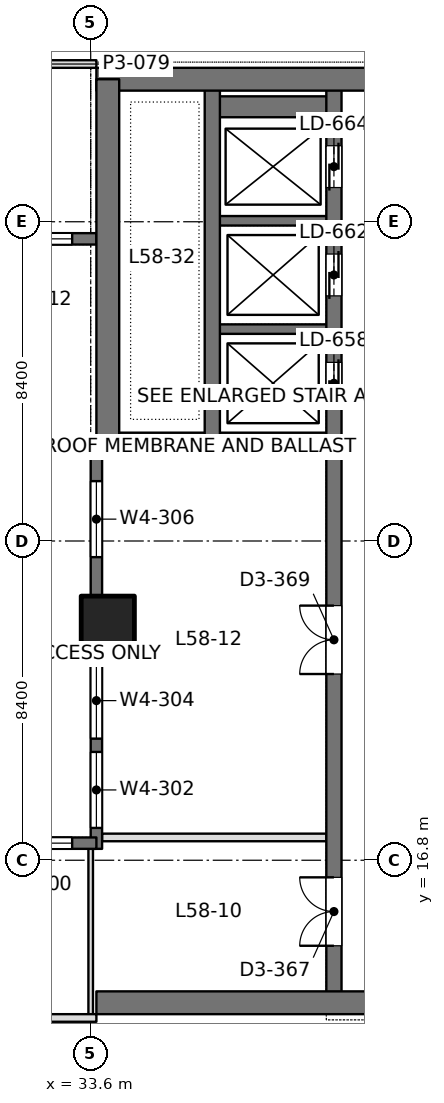
"""IFC4 building model, lengths in metres.
Left out: names, types, materials, properties, quantities, classifications, styles, units other than length and angle.
Written with IfcOpenShell. Run it as: python <this file> out.ifc"""

import sys

from ifc_helpers import new_model, si_unit, direction, frame, frame_2d, origin, origin_2d, place, context, subcontext, project, spatial, rectangle, extrude, element, fill, save


model = new_model("IFC4")
c1 = context("Model", 3, precision=1e-05, world=origin(), true_north=direction((0.0, 1.0)))
c2 = subcontext(c1, "Body", "Model", "MODEL_VIEW")
j1 = project(units=[si_unit("LENGTHUNIT", "METRE"), si_unit("PLANEANGLEUNIT", "RADIAN")], contexts=[c1])
p1 = place(None, origin())
s1 = spatial("IfcSite", under=j1, at=p1, CompositionType="ELEMENT")
p2 = place(p1, origin())
s2 = spatial("IfcBuilding", under=s1, at=p2, CompositionType="ELEMENT")
p3 = place(p2, frame((0.0, 0.0, 254.7)))
s3 = spatial("IfcBuildingStorey", under=s2, at=p3, CompositionType="ELEMENT", Elevation=254.7)
p4 = place(p3, frame((34.05, 23.05, 0.0), z_axis=(0.0, 0.0, 1.0), x_axis=(1.0, 0.0, 0.0)))
e1 = element("IfcColumn", 1, at=p4, inside=s3, PredefinedType="COLUMN", context=c2, shape_type="SweptSolid", body=[
    extrude(rectangle(XDim=1.4, YDim=1.4, at=origin_2d()), origin(), (0.0, 0.0, 1.0), 4.5),
])
p5 = place(p3, frame((33.75, 13.05, 0.0), z_axis=(0.0, 0.0, 1.0), x_axis=(1.0, 0.0, 0.0)))
e2 = element("IfcWall", 2, at=p5, inside=s3, PredefinedType="SHEAR", context=c2, shape_type="SweptSolid", body=[
    extrude(rectangle(XDim=17.7, YDim=0.6, at=frame_2d((8.85, 0.0))), origin(), (0.0, 0.0, 1.0), 4.5),
])
p6 = place(p5, frame((7.1, 0.0, 0.0)))
e3 = element("IfcOpeningElement", 3, at=p6, cuts=e2, PredefinedType="OPENING", context=c2, shape_type="SweptSolid", body=[
    extrude(rectangle(XDim=1.8, YDim=2.4, at=frame_2d((0.9, 1.2))), frame((0.0, 0.31, 0.0), z_axis=(0.0, -1.0, 0.0), x_axis=(1.0, 0.0, 0.0)), (0.0, 0.0, 1.0), 0.62),
])
p7 = place(p3, frame((33.75, 37.35, 0.0), z_axis=(0.0, 0.0, 1.0), x_axis=(1.0, 0.0, 0.0)))
e4 = element("IfcWall", 4, at=p7, inside=s3, PredefinedType="SHEAR", context=c2, shape_type="SweptSolid", body=[
    extrude(rectangle(XDim=17.7, YDim=0.6, at=frame_2d((8.85, 0.0))), origin(), (0.0, 0.0, 1.0), 4.5),
])
p8 = place(p7, frame((7.1, 0.0, 0.0)))
e5 = element("IfcOpeningElement", 5, at=p8, cuts=e4, PredefinedType="OPENING", context=c2, shape_type="SweptSolid", body=[
    extrude(rectangle(XDim=1.8, YDim=2.4, at=frame_2d((0.9, 1.2))), frame((0.0, 0.31, 0.0), z_axis=(0.0, -1.0, 0.0), x_axis=(1.0, 0.0, 0.0)), (0.0, 0.0, 1.0), 0.62),
])
p9 = place(p3, frame((34.05, 27.8, 0.0), z_axis=(0.0, 0.0, 1.0), x_axis=(0.0, 1.0, 0.0)))
e6 = element("IfcWall", 6, at=p9, inside=s3, PredefinedType="SHEAR", context=c2, shape_type="SweptSolid", body=[
    extrude(rectangle(XDim=9.55, YDim=0.6, at=frame_2d((4.775, 0.0))), origin(), (0.0, 0.0, 1.0), 4.5),
])
p10 = place(p3, frame((40.0, 13.05, 0.0), z_axis=(0.0, 0.0, 1.0), x_axis=(0.0, 1.0, 0.0)))
e7 = element("IfcWall", 7, at=p10, inside=s3, PredefinedType="SHEAR", context=c2, shape_type="SweptSolid", body=[
    extrude(rectangle(XDim=24.3, YDim=0.4, at=frame_2d((12.15, 0.0))), origin(), (0.0, 0.0, 1.0), 4.5),
])
p11 = place(p10, frame((15.75, 0.0, 0.0)))
e8 = element("IfcOpeningElement", 8, at=p11, cuts=e7, PredefinedType="OPENING", context=c2, shape_type="SweptSolid", body=[
    extrude(rectangle(XDim=1.1, YDim=2.2, at=frame_2d((0.55, 1.1))), frame((0.0, 0.21, 0.0), z_axis=(0.0, -1.0, 0.0), x_axis=(1.0, 0.0, 0.0)), (0.0, 0.0, 1.0), 0.42),
])
p12 = place(p10, frame((18.6, 0.0, 0.0)))
e9 = element("IfcOpeningElement", 9, at=p12, cuts=e7, PredefinedType="OPENING", context=c2, shape_type="SweptSolid", body=[
    extrude(rectangle(XDim=1.1, YDim=2.2, at=frame_2d((0.55, 1.1))), frame((0.0, 0.21, 0.0), z_axis=(0.0, -1.0, 0.0), x_axis=(1.0, 0.0, 0.0)), (0.0, 0.0, 1.0), 0.42),
])
p13 = place(p10, frame((21.45, 0.0, 0.0)))
e10 = element("IfcOpeningElement", 10, at=p13, cuts=e7, PredefinedType="OPENING", context=c2, shape_type="SweptSolid", body=[
    extrude(rectangle(XDim=1.1, YDim=2.2, at=frame_2d((0.55, 1.1))), frame((0.0, 0.21, 0.0), z_axis=(0.0, -1.0, 0.0), x_axis=(1.0, 0.0, 0.0)), (0.0, 0.0, 1.0), 0.42),
])
p14 = place(p10, frame((8.65, 0.0, 0.0)))
e11 = element("IfcOpeningElement", 11, at=p14, cuts=e7, PredefinedType="OPENING", context=c2, shape_type="SweptSolid", body=[
    extrude(rectangle(XDim=1.8, YDim=2.4, at=frame_2d((0.9, 1.2))), frame((0.0, 0.21, 0.0), z_axis=(0.0, -1.0, 0.0), x_axis=(1.0, 0.0, 0.0)), (0.0, 0.0, 1.0), 0.42),
])
p15 = place(p10, frame((1.5, 0.0, 0.0)))
e12 = element("IfcOpeningElement", 12, at=p15, cuts=e7, PredefinedType="OPENING", context=c2, shape_type="SweptSolid", body=[
    extrude(rectangle(XDim=1.8, YDim=2.4, at=frame_2d((0.9, 1.2))), frame((0.0, 0.21, 0.0), z_axis=(0.0, -1.0, 0.0), x_axis=(1.0, 0.0, 0.0)), (0.0, 0.0, 1.0), 0.42),
])
p16 = place(p3, frame((36.8, 27.925, 0.0), z_axis=(0.0, 0.0, 1.0), x_axis=(0.0, 1.0, 0.0)))
e13 = element("IfcWall", 13, at=p16, inside=s3, PredefinedType="SHEAR", context=c2, shape_type="SweptSolid", body=[
    extrude(rectangle(XDim=9.425, YDim=0.4, at=frame_2d((4.712, 0.0))), origin(), (0.0, 0.0, 1.0), 4.5),
])
p17 = place(p3, frame((40.0, 27.925, 0.0), z_axis=(0.0, 0.0, 1.0), x_axis=(-1.0, 0.0, 0.0)))
e14 = element("IfcWall", 14, at=p17, inside=s3, PredefinedType="SHEAR", context=c2, shape_type="SweptSolid", body=[
    extrude(rectangle(XDim=5.95, YDim=0.25, at=frame_2d((2.975, 0.0))), origin(), (0.0, 0.0, 1.0), 4.5),
])
for number, where, z_axis, x_axis in (
    (15, (40.0, 30.775, 0.0), (0.0, 0.0, 1.0), (-1.0, 0.0, 0.0)),
    (16, (40.0, 33.625, 0.0), (0.0, 0.0, 1.0), (-1.0, 0.0, 0.0)),
):
    element("IfcWall", number, at=place(p3, frame(where, z_axis=z_axis, x_axis=x_axis)), inside=s3, PredefinedType="SHEAR", context=c2, shape_type="SweptSolid", body=[
        extrude(rectangle(XDim=3.2, YDim=0.25, at=frame_2d((1.6, 0.0))), origin(), (0.0, 0.0, 1.0), 4.5),
    ])
p18 = place(p3, frame((40.0, 36.625, 0.0), z_axis=(0.0, 0.0, 1.0), x_axis=(-1.0, 0.0, 0.0)))
e17 = element("IfcWall", 17, at=p18, inside=s3, PredefinedType="SHEAR", context=c2, shape_type="SweptSolid", body=[
    extrude(rectangle(XDim=3.2, YDim=0.55, at=frame_2d((1.6, 0.0))), origin(), (0.0, 0.0, 1.0), 4.5),
])
p19 = place(p3, frame((33.75, 17.1, 0.0), z_axis=(0.0, 0.0, 1.0), x_axis=(0.0, 1.0, 0.0)))
e18 = element("IfcWall", 18, at=p19, inside=s3, PredefinedType="SOLIDWALL", context=c2, shape_type="SweptSolid", body=[
    extrude(rectangle(XDim=10.7, YDim=0.3, at=frame_2d((5.35, 0.0))), origin(), (0.0, 0.0, 1.0), 4.35),
])
p20 = place(p19, frame((0.55, 0.0, 0.9)))
e19 = element("IfcOpeningElement", 19, at=p20, cuts=e18, PredefinedType="OPENING", context=c2, shape_type="SweptSolid", body=[
    extrude(rectangle(XDim=2.0, YDim=1.9, at=frame_2d((1.0, 0.95))), frame((0.0, 0.16, 0.0), z_axis=(0.0, -1.0, 0.0), x_axis=(1.0, 0.0, 0.0)), (0.0, 0.0, 1.0), 0.32),
])
p21 = place(p19, frame((2.9, 0.0, 0.9)))
e20 = element("IfcOpeningElement", 20, at=p21, cuts=e18, PredefinedType="OPENING", context=c2, shape_type="SweptSolid", body=[
    extrude(rectangle(XDim=2.0, YDim=1.9, at=frame_2d((1.0, 0.95))), frame((0.0, 0.16, 0.0), z_axis=(0.0, -1.0, 0.0), x_axis=(1.0, 0.0, 0.0)), (0.0, 0.0, 1.0), 0.32),
])
p22 = place(p19, frame((7.675, 0.0, 0.9)))
e21 = element("IfcOpeningElement", 21, at=p22, cuts=e18, PredefinedType="OPENING", context=c2, shape_type="SweptSolid", body=[
    extrude(rectangle(XDim=2.0, YDim=1.9, at=frame_2d((1.0, 0.95))), frame((0.0, 0.16, 0.0), z_axis=(0.0, -1.0, 0.0), x_axis=(1.0, 0.0, 0.0)), (0.0, 0.0, 1.0), 0.32),
])
p23 = place(p3, frame((25.7, 17.25, 0.0), z_axis=(0.0, 0.0, 1.0), x_axis=(1.0, 0.0, 0.0)))
e22 = element("IfcWall", 22, at=p23, inside=s3, PredefinedType="SOLIDWALL", context=c2, shape_type="SweptSolid", body=[
    extrude(rectangle(XDim=8.05, YDim=0.3, at=frame_2d((4.025, 0.0))), origin(), (0.0, 0.0, 1.0), 4.35),
])
p24 = place(p23, frame((0.137, 0.0, 0.9)))
e23 = element("IfcOpeningElement", 23, at=p24, cuts=e22, PredefinedType="OPENING", context=c2, shape_type="SweptSolid", body=[
    extrude(rectangle(XDim=2.0, YDim=1.9, at=frame_2d((1.0, 0.95))), frame((0.0, 0.16, 0.0), z_axis=(0.0, -1.0, 0.0), x_axis=(1.0, 0.0, 0.0)), (0.0, 0.0, 1.0), 0.32),
])
p25 = place(p23, frame((2.775, 0.0, 0.9)))
e24 = element("IfcOpeningElement", 24, at=p25, cuts=e22, PredefinedType="OPENING", context=c2, shape_type="SweptSolid", body=[
    extrude(rectangle(XDim=2.0, YDim=1.9, at=frame_2d((1.0, 0.95))), frame((0.0, 0.16, 0.0), z_axis=(0.0, -1.0, 0.0), x_axis=(1.0, 0.0, 0.0)), (0.0, 0.0, 1.0), 0.32),
])
p26 = place(p23, frame((5.413, 0.0, 0.9)))
e25 = element("IfcOpeningElement", 25, at=p26, cuts=e22, PredefinedType="OPENING", context=c2, shape_type="SweptSolid", body=[
    extrude(rectangle(XDim=2.0, YDim=1.9, at=frame_2d((1.0, 0.95))), frame((0.0, 0.16, 0.0), z_axis=(0.0, -1.0, 0.0), x_axis=(1.0, 0.0, 0.0)), (0.0, 0.0, 1.0), 0.32),
])
p27 = place(p3, frame((25.7, 33.15, 0.0), z_axis=(0.0, 0.0, 1.0), x_axis=(1.0, 0.0, 0.0)))
e26 = element("IfcWall", 26, at=p27, inside=s3, PredefinedType="SOLIDWALL", context=c2, shape_type="SweptSolid", body=[
    extrude(rectangle(XDim=8.05, YDim=0.3, at=frame_2d((4.025, 0.0))), origin(), (0.0, 0.0, 1.0), 4.35),
])
p28 = place(p27, frame((0.137, 0.0, 0.9)))
e27 = element("IfcOpeningElement", 27, at=p28, cuts=e26, PredefinedType="OPENING", context=c2, shape_type="SweptSolid", body=[
    extrude(rectangle(XDim=2.0, YDim=1.9, at=frame_2d((1.0, 0.95))), frame((0.0, 0.16, 0.0), z_axis=(0.0, -1.0, 0.0), x_axis=(1.0, 0.0, 0.0)), (0.0, 0.0, 1.0), 0.32),
])
p29 = place(p27, frame((2.775, 0.0, 0.9)))
e28 = element("IfcOpeningElement", 28, at=p29, cuts=e26, PredefinedType="OPENING", context=c2, shape_type="SweptSolid", body=[
    extrude(rectangle(XDim=2.0, YDim=1.9, at=frame_2d((1.0, 0.95))), frame((0.0, 0.16, 0.0), z_axis=(0.0, -1.0, 0.0), x_axis=(1.0, 0.0, 0.0)), (0.0, 0.0, 1.0), 0.32),
])
p30 = place(p27, frame((5.413, 0.0, 0.9)))
e29 = element("IfcOpeningElement", 29, at=p30, cuts=e26, PredefinedType="OPENING", context=c2, shape_type="SweptSolid", body=[
    extrude(rectangle(XDim=2.0, YDim=1.9, at=frame_2d((1.0, 0.95))), frame((0.0, 0.16, 0.0), z_axis=(0.0, -1.0, 0.0), x_axis=(1.0, 0.0, 0.0)), (0.0, 0.0, 1.0), 0.32),
])
p31 = place(p3, frame((33.898, 17.4, 0.0), z_axis=(0.0, 0.0, 1.0), x_axis=(1.0, 0.0, 0.0)))
e30 = element("IfcWall", 30, at=p31, inside=s3, PredefinedType="PARTITIONING", context=c2, shape_type="SweptSolid", body=[
    extrude(rectangle(XDim=5.904, YDim=0.2, at=frame_2d((2.952, 0.0))), origin(), (0.0, 0.0, 1.0), 3.8),
])
p32 = place(p3, frame((33.6, 12.6, 0.0), z_axis=(0.0, 0.0, 1.0), x_axis=(0.0, 1.0, 0.0)))
e31 = element("IfcWall", 31, at=p32, inside=s3, PredefinedType="PARTITIONING", context=c2, shape_type="SweptSolid", body=[
    extrude(rectangle(XDim=4.502, YDim=0.12, at=frame_2d((2.251, 0.0))), origin(), (0.0, 0.0, 1.0), 3.66),
])
p33 = place(p3, frame((16.65, 12.65, 0.0), z_axis=(0.0, 0.0, 1.0), x_axis=(1.0, 0.0, 0.0)))
e32 = element("IfcWall", 32, at=p33, inside=s3, PredefinedType="PARTITIONING", context=c2, shape_type="SweptSolid", body=[
    extrude(rectangle(XDim=17.1, YDim=0.2, at=frame_2d((8.55, 0.0))), origin(), (0.0, 0.0, 1.0), 3.8),
])
p34 = place(p33, frame((7.65, 0.0, 0.0)))
e33 = element("IfcOpeningElement", 33, at=p34, cuts=e32, PredefinedType="OPENING", context=c2, shape_type="SweptSolid", body=[
    extrude(rectangle(XDim=1.8, YDim=2.2, at=frame_2d((0.9, 1.1))), frame((0.0, 0.11, 0.0), z_axis=(0.0, -1.0, 0.0), x_axis=(1.0, 0.0, 0.0)), (0.0, 0.0, 1.0), 0.22),
])
p35 = place(p3, frame((16.65, 37.75, 0.0), z_axis=(0.0, 0.0, 1.0), x_axis=(1.0, 0.0, 0.0)))
e34 = element("IfcWall", 34, at=p35, inside=s3, PredefinedType="PARTITIONING", context=c2, shape_type="SweptSolid", body=[
    extrude(rectangle(XDim=17.1, YDim=0.2, at=frame_2d((8.55, 0.0))), origin(), (0.0, 0.0, 1.0), 3.8),
])
p36 = place(p35, frame((2.32, 0.0, 0.0)))
e35 = element("IfcOpeningElement", 35, at=p36, cuts=e34, PredefinedType="OPENING", context=c2, shape_type="SweptSolid", body=[
    extrude(rectangle(XDim=1.1, YDim=2.4, at=frame_2d((0.55, 1.2))), frame((0.0, 0.11, 0.0), z_axis=(0.0, -1.0, 0.0), x_axis=(1.0, 0.0, 0.0)), (0.0, 0.0, 1.0), 0.22),
])
p37 = place(p35, frame((10.72, 0.0, 0.0)))
e36 = element("IfcOpeningElement", 36, at=p37, cuts=e34, PredefinedType="OPENING", context=c2, shape_type="SweptSolid", body=[
    extrude(rectangle(XDim=1.1, YDim=2.4, at=frame_2d((0.55, 1.2))), frame((0.0, 0.11, 0.0), z_axis=(0.0, -1.0, 0.0), x_axis=(1.0, 0.0, 0.0)), (0.0, 0.0, 1.0), 0.22),
])
p38 = place(p20, origin())
e37 = element("IfcWindow", 37, at=p38, inside=s3, PartitioningType="SINGLE_PANEL", PredefinedType="WINDOW", context=c2, shape_type="SweptSolid", body=[
    extrude(rectangle(XDim=2.0, YDim=1.9, at=frame_2d((1.0, 0.95))), frame((0.0, 0.03, 0.0), z_axis=(0.0, -1.0, 0.0), x_axis=(1.0, 0.0, 0.0)), (0.0, 0.0, 1.0), 0.06),
])
fill(e19, e37)
p39 = place(p21, origin())
e38 = element("IfcWindow", 38, at=p39, inside=s3, PartitioningType="SINGLE_PANEL", PredefinedType="WINDOW", context=c2, shape_type="SweptSolid", body=[
    extrude(rectangle(XDim=2.0, YDim=1.9, at=frame_2d((1.0, 0.95))), frame((0.0, 0.03, 0.0), z_axis=(0.0, -1.0, 0.0), x_axis=(1.0, 0.0, 0.0)), (0.0, 0.0, 1.0), 0.06),
])
fill(e20, e38)
p40 = place(p22, origin())
e39 = element("IfcWindow", 39, at=p40, inside=s3, PartitioningType="SINGLE_PANEL", PredefinedType="WINDOW", context=c2, shape_type="SweptSolid", body=[
    extrude(rectangle(XDim=2.0, YDim=1.9, at=frame_2d((1.0, 0.95))), frame((0.0, 0.03, 0.0), z_axis=(0.0, -1.0, 0.0), x_axis=(1.0, 0.0, 0.0)), (0.0, 0.0, 1.0), 0.06),
])
fill(e21, e39)
p41 = place(p26, origin())
e40 = element("IfcWindow", 40, at=p41, inside=s3, PartitioningType="SINGLE_PANEL", PredefinedType="WINDOW", context=c2, shape_type="SweptSolid", body=[
    extrude(rectangle(XDim=2.0, YDim=1.9, at=frame_2d((1.0, 0.95))), frame((0.0, 0.03, 0.0), z_axis=(0.0, -1.0, 0.0), x_axis=(1.0, 0.0, 0.0)), (0.0, 0.0, 1.0), 0.06),
])
fill(e25, e40)
p42 = place(p30, origin())
e41 = element("IfcWindow", 41, at=p42, inside=s3, PartitioningType="SINGLE_PANEL", PredefinedType="WINDOW", context=c2, shape_type="SweptSolid", body=[
    extrude(rectangle(XDim=2.0, YDim=1.9, at=frame_2d((1.0, 0.95))), frame((0.0, 0.03, 0.0), z_axis=(0.0, -1.0, 0.0), x_axis=(1.0, 0.0, 0.0)), (0.0, 0.0, 1.0), 0.06),
])
fill(e29, e41)
p43 = place(p11, origin())
e42 = element("IfcDoor", 42, at=p43, inside=s3, OperationType="DOUBLE_DOOR_SLIDING", PredefinedType="DOOR", context=c2, shape_type="SweptSolid", body=[
    extrude(rectangle(XDim=1.1, YDim=2.2, at=frame_2d((0.55, 1.1))), frame((0.0, 0.025, 0.0), z_axis=(0.0, -1.0, 0.0), x_axis=(1.0, 0.0, 0.0)), (0.0, 0.0, 1.0), 0.05),
])
fill(e8, e42)
p44 = place(p12, origin())
e43 = element("IfcDoor", 43, at=p44, inside=s3, OperationType="DOUBLE_DOOR_SLIDING", PredefinedType="DOOR", context=c2, shape_type="SweptSolid", body=[
    extrude(rectangle(XDim=1.1, YDim=2.2, at=frame_2d((0.55, 1.1))), frame((0.0, 0.025, 0.0), z_axis=(0.0, -1.0, 0.0), x_axis=(1.0, 0.0, 0.0)), (0.0, 0.0, 1.0), 0.05),
])
fill(e9, e43)
p45 = place(p13, origin())
e44 = element("IfcDoor", 44, at=p45, inside=s3, OperationType="DOUBLE_DOOR_SLIDING", PredefinedType="DOOR", context=c2, shape_type="SweptSolid", body=[
    extrude(rectangle(XDim=1.1, YDim=2.2, at=frame_2d((0.55, 1.1))), frame((0.0, 0.025, 0.0), z_axis=(0.0, -1.0, 0.0), x_axis=(1.0, 0.0, 0.0)), (0.0, 0.0, 1.0), 0.05),
])
fill(e10, e44)
p46 = place(p14, origin())
e45 = element("IfcDoor", 45, at=p46, inside=s3, OperationType="DOUBLE_DOOR_SINGLE_SWING", PredefinedType="DOOR", context=c2, shape_type="SweptSolid", body=[
    extrude(rectangle(XDim=1.8, YDim=2.4, at=frame_2d((0.9, 1.2))), frame((0.0, 0.025, 0.0), z_axis=(0.0, -1.0, 0.0), x_axis=(1.0, 0.0, 0.0)), (0.0, 0.0, 1.0), 0.05),
])
fill(e11, e45)
p47 = place(p15, origin())
e46 = element("IfcDoor", 46, at=p47, inside=s3, OperationType="DOUBLE_DOOR_SINGLE_SWING", PredefinedType="DOOR", context=c2, shape_type="SweptSolid", body=[
    extrude(rectangle(XDim=1.8, YDim=2.4, at=frame_2d((0.9, 1.2))), frame((0.0, 0.025, 0.0), z_axis=(0.0, -1.0, 0.0), x_axis=(1.0, 0.0, 0.0)), (0.0, 0.0, 1.0), 0.05),
])
fill(e12, e46)
save(model, sys.argv[1])
